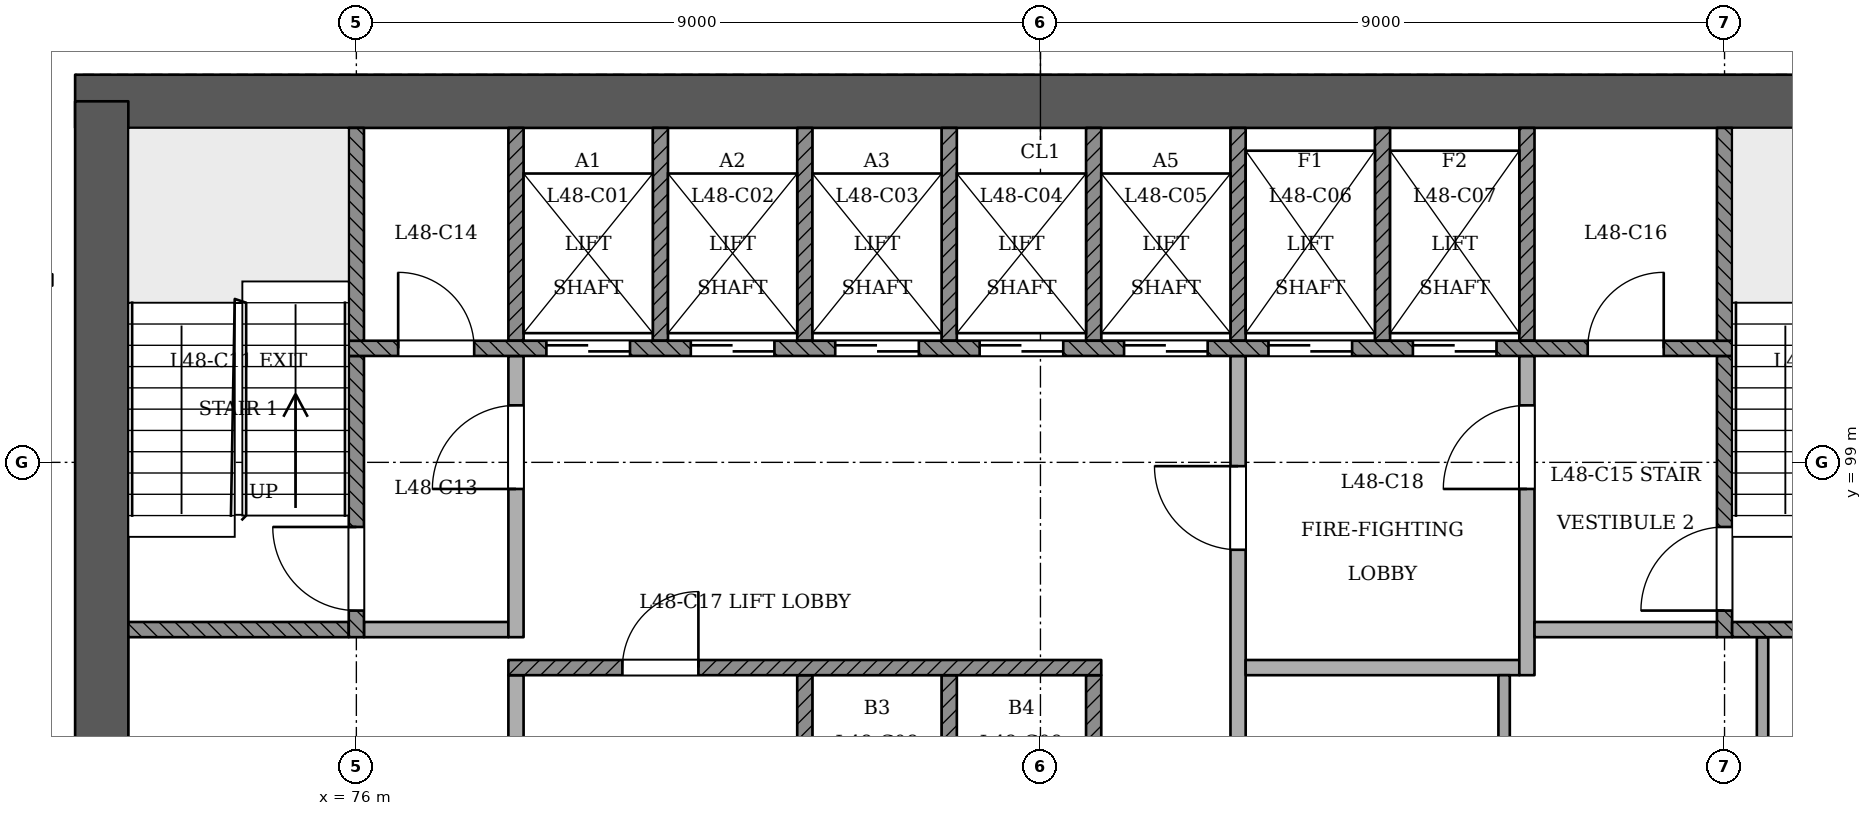
"""IFC4 building model, lengths in metres.
Left out: names, types, materials, properties, quantities, classifications, styles, units other than length and angle.
Written with IfcOpenShell. Run it as: python <this file> out.ifc"""

import sys

from ifc_helpers import new_model, si_unit, direction, frame, frame_2d, origin, place, context, subcontext, project, spatial, rectangle, extrude, element, fill, save


model = new_model("IFC4")
c1 = context("Model", 3, precision=1e-05, world=origin(), true_north=direction((0.0, 1.0)))
c2 = subcontext(c1, "Body", "Model", "MODEL_VIEW")
j1 = project(units=[si_unit("LENGTHUNIT", "METRE"), si_unit("PLANEANGLEUNIT", "RADIAN")], contexts=[c1])
p1 = place(None, origin())
s1 = spatial("IfcSite", under=j1, at=p1, CompositionType="ELEMENT")
p2 = place(p1, origin())
s2 = spatial("IfcBuilding", under=s1, at=p2, CompositionType="ELEMENT")
p3 = place(p2, frame((0.0, 0.0, 185.4)))
s3 = spatial("IfcBuildingStorey", under=s2, at=p3, CompositionType="ELEMENT", Elevation=185.4)
p4 = place(p3, frame((97.35, 103.75, 0.0), z_axis=(0.0, 0.0, 1.0), x_axis=(-1.0, 0.0, 0.0)))
e1 = element("IfcWall", 1, at=p4, inside=s3, PredefinedType="SHEAR", context=c2, shape_type="SweptSolid", body=[
    extrude(rectangle(XDim=25.05, YDim=0.7, at=frame_2d((12.525, 0.0))), origin(), (0.0, 0.0, 1.0), 3.6),
])
p5 = place(p3, frame((72.65, 103.75, 0.0), z_axis=(0.0, 0.0, 1.0), x_axis=(0.0, -1.0, 0.0)))
e2 = element("IfcWall", 2, at=p5, inside=s3, PredefinedType="SHEAR", context=c2, shape_type="SweptSolid", body=[
    extrude(rectangle(XDim=11.05, YDim=0.7, at=frame_2d((5.525, 0.0))), origin(), (0.0, 0.0, 1.0), 3.6),
])
p6 = place(p3, frame((78.1, 93.4, 0.0), z_axis=(0.0, 0.0, 1.0), x_axis=(0.0, 1.0, 0.0)))
e3 = element("IfcWall", 3, at=p6, inside=s3, PredefinedType="PARTITIONING", context=c2, shape_type="SweptSolid", body=[
    extrude(rectangle(XDim=2.8, YDim=0.2, at=frame_2d((1.4, 0.0))), origin(), (0.0, 0.0, 1.0), 3.3),
])
for number, where, z_axis, x_axis in (
    (4, (81.9, 93.4, 0.0), (0.0, 0.0, 1.0), (0.0, 1.0, 0.0)),
    (5, (83.8, 93.4, 0.0), (0.0, 0.0, 1.0), (0.0, 1.0, 0.0)),
    (6, (85.7, 93.4, 0.0), (0.0, 0.0, 1.0), (0.0, 1.0, 0.0)),
):
    element("IfcWall", number, at=place(p3, frame(where, z_axis=z_axis, x_axis=x_axis)), inside=s3, PredefinedType="SOLIDWALL", context=c2, shape_type="SweptSolid", body=[
        extrude(rectangle(XDim=2.8, YDim=0.2, at=frame_2d((1.4, 0.0))), origin(), (0.0, 0.0, 1.0), 3.3),
    ])
p7 = place(p3, frame((87.6, 93.4, 0.0), z_axis=(0.0, 0.0, 1.0), x_axis=(0.0, 1.0, 0.0)))
e7 = element("IfcWall", 7, at=p7, inside=s3, PredefinedType="PARTITIONING", context=c2, shape_type="SweptSolid", body=[
    extrude(rectangle(XDim=7.0, YDim=0.2, at=frame_2d((3.5, 0.0))), origin(), (0.0, 0.0, 1.0), 3.3),
])
p8 = place(p7, frame((4.45, 0.0, 0.0)))
e8 = element("IfcOpeningElement", 8, at=p8, cuts=e7, PredefinedType="OPENING", context=c2, shape_type="SweptSolid", body=[
    extrude(rectangle(XDim=1.1, YDim=2.1, at=frame_2d((0.55, 1.05))), frame((0.0, 0.11, 0.0), z_axis=(0.0, -1.0, 0.0), x_axis=(1.0, 0.0, 0.0)), (0.0, 0.0, 1.0), 0.221),
])
p9 = place(p3, frame((91.1, 93.4, 0.0), z_axis=(0.0, 0.0, 1.0), x_axis=(0.0, 1.0, 0.0)))
e9 = element("IfcWall", 9, at=p9, inside=s3, PredefinedType="PARTITIONING", context=c2, shape_type="SweptSolid", body=[
    extrude(rectangle(XDim=2.8, YDim=0.15, at=frame_2d((1.4, 0.0))), origin(), (0.0, 0.0, 1.0), 3.3),
])
p10 = place(p3, frame((94.5, 93.4, 0.0), z_axis=(0.0, 0.0, 1.0), x_axis=(0.0, 1.0, 0.0)))
e10 = element("IfcWall", 10, at=p10, inside=s3, PredefinedType="PARTITIONING", context=c2, shape_type="SweptSolid", body=[
    extrude(rectangle(XDim=3.3, YDim=0.15, at=frame_2d((1.65, 0.0))), origin(), (0.0, 0.0, 1.0), 3.3),
])
p11 = place(p3, frame((78.0, 96.3, 0.0), z_axis=(0.0, 0.0, 1.0), x_axis=(1.0, 0.0, 0.0)))
e11 = element("IfcWall", 11, at=p11, inside=s3, PredefinedType="SOLIDWALL", context=c2, shape_type="SweptSolid", body=[
    extrude(rectangle(XDim=7.8, YDim=0.2, at=frame_2d((3.9, 0.0))), origin(), (0.0, 0.0, 1.0), 3.3),
])
p12 = place(p11, frame((1.5, 0.0, 0.0)))
e12 = element("IfcOpeningElement", 12, at=p12, cuts=e11, PredefinedType="OPENING", context=c2, shape_type="SweptSolid", body=[
    extrude(rectangle(XDim=1.0, YDim=2.1, at=frame_2d((0.5, 1.05))), frame((0.0, 0.11, 0.0), z_axis=(0.0, -1.0, 0.0), x_axis=(1.0, 0.0, 0.0)), (0.0, 0.0, 1.0), 0.221),
])
p13 = place(p3, frame((87.7, 96.3, 0.0), z_axis=(0.0, 0.0, 1.0), x_axis=(1.0, 0.0, 0.0)))
e13 = element("IfcWall", 13, at=p13, inside=s3, PredefinedType="PARTITIONING", context=c2, shape_type="SweptSolid", body=[
    extrude(rectangle(XDim=3.6, YDim=0.2, at=frame_2d((1.8, 0.0))), origin(), (0.0, 0.0, 1.0), 3.3),
])
p14 = place(p3, frame((91.4, 96.2, 0.0), z_axis=(0.0, 0.0, 1.0), x_axis=(0.0, 1.0, 0.0)))
e14 = element("IfcWall", 14, at=p14, inside=s3, PredefinedType="PARTITIONING", context=c2, shape_type="SweptSolid", body=[
    extrude(rectangle(XDim=4.2, YDim=0.2, at=frame_2d((2.1, 0.0))), origin(), (0.0, 0.0, 1.0), 3.3),
])
p15 = place(p14, frame((2.45, 0.0, 0.0)))
e15 = element("IfcOpeningElement", 15, at=p15, cuts=e14, PredefinedType="OPENING", context=c2, shape_type="SweptSolid", body=[
    extrude(rectangle(XDim=1.1, YDim=2.1, at=frame_2d((0.55, 1.05))), frame((0.0, 0.11, 0.0), z_axis=(0.0, -1.0, 0.0), x_axis=(1.0, 0.0, 0.0)), (0.0, 0.0, 1.0), 0.221),
])
p16 = place(p3, frame((73.0, 96.8, 0.0), z_axis=(0.0, 0.0, 1.0), x_axis=(1.0, 0.0, 0.0)))
e16 = element("IfcWall", 16, at=p16, inside=s3, PredefinedType="SOLIDWALL", context=c2, shape_type="SweptSolid", body=[
    extrude(rectangle(XDim=2.9, YDim=0.2, at=frame_2d((1.45, 0.0))), origin(), (0.0, 0.0, 1.0), 3.3),
])
p17 = place(p3, frame((76.0, 96.7, 0.0), z_axis=(0.0, 0.0, 1.0), x_axis=(0.0, 1.0, 0.0)))
e17 = element("IfcWall", 17, at=p17, inside=s3, PredefinedType="SOLIDWALL", context=c2, shape_type="SweptSolid", body=[
    extrude(rectangle(XDim=3.7, YDim=0.2, at=frame_2d((1.85, 0.0))), origin(), (0.0, 0.0, 1.0), 3.3),
])
p18 = place(p17, frame((0.35, 0.0, 0.0)))
e18 = element("IfcOpeningElement", 18, at=p18, cuts=e17, PredefinedType="OPENING", context=c2, shape_type="SweptSolid", body=[
    extrude(rectangle(XDim=1.1, YDim=2.1, at=frame_2d((0.55, 1.05))), frame((0.0, 0.11, 0.0), z_axis=(0.0, -1.0, 0.0), x_axis=(1.0, 0.0, 0.0)), (0.0, 0.0, 1.0), 0.221),
])
p19 = place(p3, frame((76.1, 96.8, 0.0), z_axis=(0.0, 0.0, 1.0), x_axis=(1.0, 0.0, 0.0)))
e19 = element("IfcWall", 19, at=p19, inside=s3, PredefinedType="PARTITIONING", context=c2, shape_type="SweptSolid", body=[
    extrude(rectangle(XDim=1.9, YDim=0.2, at=frame_2d((0.95, 0.0))), origin(), (0.0, 0.0, 1.0), 3.3),
])
p20 = place(p3, frame((78.1, 96.7, 0.0), z_axis=(0.0, 0.0, 1.0), x_axis=(0.0, 1.0, 0.0)))
e20 = element("IfcWall", 20, at=p20, inside=s3, PredefinedType="PARTITIONING", context=c2, shape_type="SweptSolid", body=[
    extrude(rectangle(XDim=3.7, YDim=0.2, at=frame_2d((1.85, 0.0))), origin(), (0.0, 0.0, 1.0), 3.3),
])
p21 = place(p20, frame((1.95, 0.0, 0.0)))
e21 = element("IfcOpeningElement", 21, at=p21, cuts=e20, PredefinedType="OPENING", context=c2, shape_type="SweptSolid", body=[
    extrude(rectangle(XDim=1.1, YDim=2.1, at=frame_2d((0.55, 1.05))), frame((0.0, 0.11, 0.0), z_axis=(0.0, -1.0, 0.0), x_axis=(1.0, 0.0, 0.0)), (0.0, 0.0, 1.0), 0.221),
])
p22 = place(p3, frame((91.5, 96.8, 0.0), z_axis=(0.0, 0.0, 1.0), x_axis=(1.0, 0.0, 0.0)))
e22 = element("IfcWall", 22, at=p22, inside=s3, PredefinedType="PARTITIONING", context=c2, shape_type="SweptSolid", body=[
    extrude(rectangle(XDim=2.4, YDim=0.2, at=frame_2d((1.2, 0.0))), origin(), (0.0, 0.0, 1.0), 3.3),
])
p23 = place(p3, frame((94.0, 96.7, 0.0), z_axis=(0.0, 0.0, 1.0), x_axis=(0.0, 1.0, 0.0)))
e23 = element("IfcWall", 23, at=p23, inside=s3, PredefinedType="SOLIDWALL", context=c2, shape_type="SweptSolid", body=[
    extrude(rectangle(XDim=3.7, YDim=0.2, at=frame_2d((1.85, 0.0))), origin(), (0.0, 0.0, 1.0), 3.3),
])
p24 = place(p23, frame((0.35, 0.0, 0.0)))
e24 = element("IfcOpeningElement", 24, at=p24, cuts=e23, PredefinedType="OPENING", context=c2, shape_type="SweptSolid", body=[
    extrude(rectangle(XDim=1.1, YDim=2.1, at=frame_2d((0.55, 1.05))), frame((0.0, 0.11, 0.0), z_axis=(0.0, -1.0, 0.0), x_axis=(1.0, 0.0, 0.0)), (0.0, 0.0, 1.0), 0.221),
])
p25 = place(p3, frame((94.1, 96.8, 0.0), z_axis=(0.0, 0.0, 1.0), x_axis=(1.0, 0.0, 0.0)))
e25 = element("IfcWall", 25, at=p25, inside=s3, PredefinedType="SOLIDWALL", context=c2, shape_type="SweptSolid", body=[
    extrude(rectangle(XDim=2.9, YDim=0.2, at=frame_2d((1.45, 0.0))), origin(), (0.0, 0.0, 1.0), 3.3),
])
p26 = place(p3, frame((75.9, 100.5, 0.0), z_axis=(0.0, 0.0, 1.0), x_axis=(1.0, 0.0, 0.0)))
e26 = element("IfcWall", 26, at=p26, inside=s3, PredefinedType="SOLIDWALL", context=c2, shape_type="SweptSolid", body=[
    extrude(rectangle(XDim=18.2, YDim=0.2, at=frame_2d((9.1, 0.0))), origin(), (0.0, 0.0, 1.0), 3.3),
])
p27 = place(p26, frame((2.6, 0.0, 0.0)))
e27 = element("IfcOpeningElement", 27, at=p27, cuts=e26, PredefinedType="OPENING", context=c2, shape_type="SweptSolid", body=[
    extrude(rectangle(XDim=1.1, YDim=2.1, at=frame_2d((0.55, 1.05))), frame((0.0, 0.11, 0.0), z_axis=(0.0, -1.0, 0.0), x_axis=(1.0, 0.0, 0.0)), (0.0, 0.0, 1.0), 0.221),
])
p28 = place(p26, frame((4.5, 0.0, 0.0)))
e28 = element("IfcOpeningElement", 28, at=p28, cuts=e26, PredefinedType="OPENING", context=c2, shape_type="SweptSolid", body=[
    extrude(rectangle(XDim=1.1, YDim=2.1, at=frame_2d((0.55, 1.05))), frame((0.0, 0.11, 0.0), z_axis=(0.0, -1.0, 0.0), x_axis=(1.0, 0.0, 0.0)), (0.0, 0.0, 1.0), 0.221),
])
p29 = place(p26, frame((6.4, 0.0, 0.0)))
e29 = element("IfcOpeningElement", 29, at=p29, cuts=e26, PredefinedType="OPENING", context=c2, shape_type="SweptSolid", body=[
    extrude(rectangle(XDim=1.1, YDim=2.1, at=frame_2d((0.55, 1.05))), frame((0.0, 0.11, 0.0), z_axis=(0.0, -1.0, 0.0), x_axis=(1.0, 0.0, 0.0)), (0.0, 0.0, 1.0), 0.221),
])
p30 = place(p26, frame((8.3, 0.0, 0.0)))
e30 = element("IfcOpeningElement", 30, at=p30, cuts=e26, PredefinedType="OPENING", context=c2, shape_type="SweptSolid", body=[
    extrude(rectangle(XDim=1.1, YDim=2.1, at=frame_2d((0.55, 1.05))), frame((0.0, 0.11, 0.0), z_axis=(0.0, -1.0, 0.0), x_axis=(1.0, 0.0, 0.0)), (0.0, 0.0, 1.0), 0.221),
])
p31 = place(p26, frame((10.2, 0.0, 0.0)))
e31 = element("IfcOpeningElement", 31, at=p31, cuts=e26, PredefinedType="OPENING", context=c2, shape_type="SweptSolid", body=[
    extrude(rectangle(XDim=1.1, YDim=2.1, at=frame_2d((0.55, 1.05))), frame((0.0, 0.11, 0.0), z_axis=(0.0, -1.0, 0.0), x_axis=(1.0, 0.0, 0.0)), (0.0, 0.0, 1.0), 0.221),
])
p32 = place(p26, frame((12.1, 0.0, 0.0)))
e32 = element("IfcOpeningElement", 32, at=p32, cuts=e26, PredefinedType="OPENING", context=c2, shape_type="SweptSolid", body=[
    extrude(rectangle(XDim=1.1, YDim=2.1, at=frame_2d((0.55, 1.05))), frame((0.0, 0.11, 0.0), z_axis=(0.0, -1.0, 0.0), x_axis=(1.0, 0.0, 0.0)), (0.0, 0.0, 1.0), 0.221),
])
p33 = place(p26, frame((14.0, 0.0, 0.0)))
e33 = element("IfcOpeningElement", 33, at=p33, cuts=e26, PredefinedType="OPENING", context=c2, shape_type="SweptSolid", body=[
    extrude(rectangle(XDim=1.1, YDim=2.1, at=frame_2d((0.55, 1.05))), frame((0.0, 0.11, 0.0), z_axis=(0.0, -1.0, 0.0), x_axis=(1.0, 0.0, 0.0)), (0.0, 0.0, 1.0), 0.221),
])
p34 = place(p26, frame((0.65, 0.0, 0.0)))
e34 = element("IfcOpeningElement", 34, at=p34, cuts=e26, PredefinedType="OPENING", context=c2, shape_type="SweptSolid", body=[
    extrude(rectangle(XDim=1.0, YDim=2.1, at=frame_2d((0.5, 1.05))), frame((0.0, 0.11, 0.0), z_axis=(0.0, -1.0, 0.0), x_axis=(1.0, 0.0, 0.0)), (0.0, 0.0, 1.0), 0.221),
])
p35 = place(p26, frame((16.3, 0.0, 0.0)))
e35 = element("IfcOpeningElement", 35, at=p35, cuts=e26, PredefinedType="OPENING", context=c2, shape_type="SweptSolid", body=[
    extrude(rectangle(XDim=1.0, YDim=2.1, at=frame_2d((0.5, 1.05))), frame((0.0, 0.11, 0.0), z_axis=(0.0, -1.0, 0.0), x_axis=(1.0, 0.0, 0.0)), (0.0, 0.0, 1.0), 0.221),
])
for number, where, z_axis, x_axis in (
    (36, (76.0, 100.6, 0.0), (0.0, 0.0, 1.0), (0.0, 1.0, 0.0)),
    (37, (78.1, 100.6, 0.0), (0.0, 0.0, 1.0), (0.0, 1.0, 0.0)),
    (38, (80.0, 100.6, 0.0), (0.0, 0.0, 1.0), (0.0, 1.0, 0.0)),
    (39, (81.9, 100.6, 0.0), (0.0, 0.0, 1.0), (0.0, 1.0, 0.0)),
    (40, (83.8, 100.6, 0.0), (0.0, 0.0, 1.0), (0.0, 1.0, 0.0)),
    (41, (85.7, 100.6, 0.0), (0.0, 0.0, 1.0), (0.0, 1.0, 0.0)),
    (42, (87.6, 100.6, 0.0), (0.0, 0.0, 1.0), (0.0, 1.0, 0.0)),
    (43, (89.5, 100.6, 0.0), (0.0, 0.0, 1.0), (0.0, 1.0, 0.0)),
    (44, (91.4, 100.6, 0.0), (0.0, 0.0, 1.0), (0.0, 1.0, 0.0)),
    (45, (94.0, 100.6, 0.0), (0.0, 0.0, 1.0), (0.0, 1.0, 0.0)),
):
    element("IfcWall", number, at=place(p3, frame(where, z_axis=z_axis, x_axis=x_axis)), inside=s3, PredefinedType="SOLIDWALL", context=c2, shape_type="SweptSolid", body=[
        extrude(rectangle(XDim=2.8, YDim=0.2, at=frame_2d((1.4, 0.0))), origin(), (0.0, 0.0, 1.0), 3.3),
    ])
p36 = place(p27, origin())
e46 = element("IfcDoor", 46, at=p36, inside=s3, OperationType="SLIDING_TO_RIGHT", PredefinedType="NOTDEFINED", context=c2, shape_type="SweptSolid", body=[
    extrude(rectangle(XDim=1.1, YDim=2.1, at=frame_2d((0.55, 1.05))), frame((0.0, 0.025, 0.0), z_axis=(0.0, -1.0, 0.0), x_axis=(1.0, 0.0, 0.0)), (0.0, 0.0, 1.0), 0.05),
])
fill(e27, e46)
p37 = place(p28, origin())
e47 = element("IfcDoor", 47, at=p37, inside=s3, OperationType="SLIDING_TO_LEFT", PredefinedType="NOTDEFINED", context=c2, shape_type="SweptSolid", body=[
    extrude(rectangle(XDim=1.1, YDim=2.1, at=frame_2d((0.55, 1.05))), frame((0.0, 0.025, 0.0), z_axis=(0.0, -1.0, 0.0), x_axis=(1.0, 0.0, 0.0)), (0.0, 0.0, 1.0), 0.05),
])
fill(e28, e47)
p38 = place(p29, origin())
e48 = element("IfcDoor", 48, at=p38, inside=s3, OperationType="SLIDING_TO_RIGHT", PredefinedType="NOTDEFINED", context=c2, shape_type="SweptSolid", body=[
    extrude(rectangle(XDim=1.1, YDim=2.1, at=frame_2d((0.55, 1.05))), frame((0.0, 0.025, 0.0), z_axis=(0.0, -1.0, 0.0), x_axis=(1.0, 0.0, 0.0)), (0.0, 0.0, 1.0), 0.05),
])
fill(e29, e48)
p39 = place(p30, origin())
e49 = element("IfcDoor", 49, at=p39, inside=s3, OperationType="SLIDING_TO_LEFT", PredefinedType="NOTDEFINED", context=c2, shape_type="SweptSolid", body=[
    extrude(rectangle(XDim=1.1, YDim=2.1, at=frame_2d((0.55, 1.05))), frame((0.0, 0.025, 0.0), z_axis=(0.0, -1.0, 0.0), x_axis=(1.0, 0.0, 0.0)), (0.0, 0.0, 1.0), 0.05),
])
fill(e30, e49)
p40 = place(p31, origin())
e50 = element("IfcDoor", 50, at=p40, inside=s3, OperationType="SLIDING_TO_RIGHT", PredefinedType="NOTDEFINED", context=c2, shape_type="SweptSolid", body=[
    extrude(rectangle(XDim=1.1, YDim=2.1, at=frame_2d((0.55, 1.05))), frame((0.0, 0.025, 0.0), z_axis=(0.0, -1.0, 0.0), x_axis=(1.0, 0.0, 0.0)), (0.0, 0.0, 1.0), 0.05),
])
fill(e31, e50)
p41 = place(p32, origin())
e51 = element("IfcDoor", 51, at=p41, inside=s3, OperationType="SLIDING_TO_RIGHT", PredefinedType="NOTDEFINED", context=c2, shape_type="SweptSolid", body=[
    extrude(rectangle(XDim=1.1, YDim=2.1, at=frame_2d((0.55, 1.05))), frame((0.0, 0.025, 0.0), z_axis=(0.0, -1.0, 0.0), x_axis=(1.0, 0.0, 0.0)), (0.0, 0.0, 1.0), 0.05),
])
fill(e32, e51)
p42 = place(p33, origin())
e52 = element("IfcDoor", 52, at=p42, inside=s3, OperationType="SLIDING_TO_LEFT", PredefinedType="NOTDEFINED", context=c2, shape_type="SweptSolid", body=[
    extrude(rectangle(XDim=1.1, YDim=2.1, at=frame_2d((0.55, 1.05))), frame((0.0, 0.025, 0.0), z_axis=(0.0, -1.0, 0.0), x_axis=(1.0, 0.0, 0.0)), (0.0, 0.0, 1.0), 0.05),
])
fill(e33, e52)
p43 = place(p18, origin())
e53 = element("IfcDoor", 53, at=p43, inside=s3, OperationType="SINGLE_SWING_RIGHT", PredefinedType="NOTDEFINED", context=c2, shape_type="SweptSolid", body=[
    extrude(rectangle(XDim=1.1, YDim=2.1, at=frame_2d((0.55, 1.05))), frame((0.0, 0.025, 0.0), z_axis=(0.0, -1.0, 0.0), x_axis=(1.0, 0.0, 0.0)), (0.0, 0.0, 1.0), 0.05),
])
fill(e18, e53)
p44 = place(p24, origin())
e54 = element("IfcDoor", 54, at=p44, inside=s3, OperationType="SINGLE_SWING_LEFT", PredefinedType="NOTDEFINED", context=c2, shape_type="SweptSolid", body=[
    extrude(rectangle(XDim=1.1, YDim=2.1, at=frame_2d((0.55, 1.05))), frame((0.0, 0.025, 0.0), z_axis=(0.0, -1.0, 0.0), x_axis=(1.0, 0.0, 0.0)), (0.0, 0.0, 1.0), 0.05),
])
fill(e24, e54)
p45 = place(p21, origin())
e55 = element("IfcDoor", 55, at=p45, inside=s3, OperationType="SINGLE_SWING_LEFT", PredefinedType="NOTDEFINED", context=c2, shape_type="SweptSolid", body=[
    extrude(rectangle(XDim=1.1, YDim=2.1, at=frame_2d((0.55, 1.05))), frame((0.0, 0.025, 0.0), z_axis=(0.0, -1.0, 0.0), x_axis=(1.0, 0.0, 0.0)), (0.0, 0.0, 1.0), 0.05),
])
fill(e21, e55)
p46 = place(p8, origin())
e56 = element("IfcDoor", 56, at=p46, inside=s3, OperationType="SINGLE_SWING_RIGHT", PredefinedType="NOTDEFINED", context=c2, shape_type="SweptSolid", body=[
    extrude(rectangle(XDim=1.1, YDim=2.1, at=frame_2d((0.55, 1.05))), frame((0.0, 0.025, 0.0), z_axis=(0.0, -1.0, 0.0), x_axis=(1.0, 0.0, 0.0)), (0.0, 0.0, 1.0), 0.05),
])
fill(e8, e56)
p47 = place(p15, origin())
e57 = element("IfcDoor", 57, at=p47, inside=s3, OperationType="SINGLE_SWING_LEFT", PredefinedType="NOTDEFINED", context=c2, shape_type="SweptSolid", body=[
    extrude(rectangle(XDim=1.1, YDim=2.1, at=frame_2d((0.55, 1.05))), frame((0.0, 0.025, 0.0), z_axis=(0.0, -1.0, 0.0), x_axis=(1.0, 0.0, 0.0)), (0.0, 0.0, 1.0), 0.05),
])
fill(e15, e57)
p48 = place(p34, origin())
e58 = element("IfcDoor", 58, at=p48, inside=s3, OperationType="SINGLE_SWING_LEFT", PredefinedType="NOTDEFINED", context=c2, shape_type="SweptSolid", body=[
    extrude(rectangle(XDim=1.0, YDim=2.1, at=frame_2d((0.5, 1.05))), frame((0.0, 0.025, 0.0), z_axis=(0.0, -1.0, 0.0), x_axis=(1.0, 0.0, 0.0)), (0.0, 0.0, 1.0), 0.05),
])
fill(e34, e58)
p49 = place(p35, origin())
e59 = element("IfcDoor", 59, at=p49, inside=s3, OperationType="SINGLE_SWING_RIGHT", PredefinedType="NOTDEFINED", context=c2, shape_type="SweptSolid", body=[
    extrude(rectangle(XDim=1.0, YDim=2.1, at=frame_2d((0.5, 1.05))), frame((0.0, 0.025, 0.0), z_axis=(0.0, -1.0, 0.0), x_axis=(1.0, 0.0, 0.0)), (0.0, 0.0, 1.0), 0.05),
])
fill(e35, e59)
p50 = place(p12, origin())
e60 = element("IfcDoor", 60, at=p50, inside=s3, OperationType="SINGLE_SWING_RIGHT", PredefinedType="NOTDEFINED", context=c2, shape_type="SweptSolid", body=[
    extrude(rectangle(XDim=1.0, YDim=2.1, at=frame_2d((0.5, 1.05))), frame((0.0, 0.025, 0.0), z_axis=(0.0, -1.0, 0.0), x_axis=(1.0, 0.0, 0.0)), (0.0, 0.0, 1.0), 0.05),
])
fill(e12, e60)
save(model, sys.argv[1])
